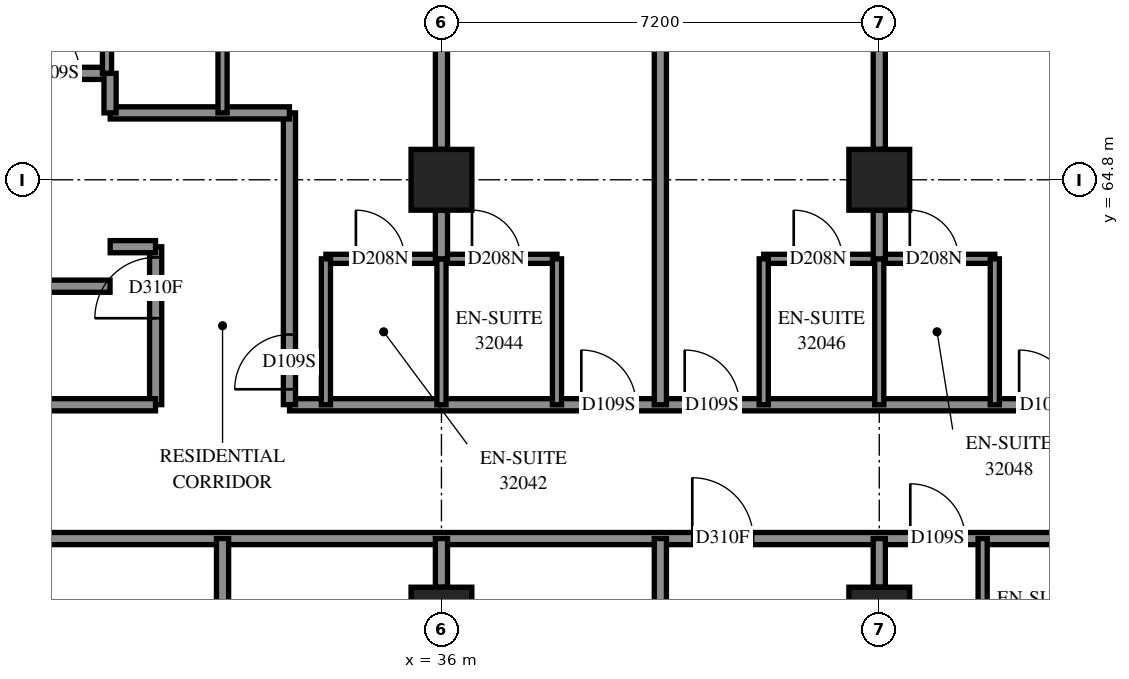
"""IFC4 building model, lengths in metres.
Left out: names, types, materials, properties, quantities, classifications, styles, units other than length and angle.
Written with IfcOpenShell. Run it as: python <this file> out.ifc"""

import sys

from ifc_helpers import new_model, si_unit, direction, frame, frame_2d, origin, origin_2d, place, context, subcontext, project, spatial, rectangle, extrude, element, fill, save


model = new_model("IFC4")
c1 = context("Model", 3, precision=1e-05, world=origin(), true_north=direction((0.0, 1.0)))
c2 = subcontext(c1, "Body", "Model", "MODEL_VIEW")
j1 = project(units=[si_unit("LENGTHUNIT", "METRE"), si_unit("PLANEANGLEUNIT", "RADIAN")], contexts=[c1])
p1 = place(None, origin())
s1 = spatial("IfcSite", under=j1, at=p1, CompositionType="ELEMENT")
p2 = place(p1, origin())
s2 = spatial("IfcBuilding", under=s1, at=p2, CompositionType="ELEMENT")
p3 = place(p2, frame((0.0, 0.0, 118.6)))
s3 = spatial("IfcBuildingStorey", under=s2, at=p3, CompositionType="ELEMENT", Elevation=118.6)
for number, where, z_axis, x_axis in (
    (1, (36.0, 57.6, 0.0), (0.0, 0.0, 1.0), (1.0, 0.0, 0.0)),
    (2, (36.0, 64.8, 0.0), (0.0, 0.0, 1.0), (1.0, 0.0, 0.0)),
    (3, (43.2, 57.6, 0.0), (0.0, 0.0, 1.0), (1.0, 0.0, 0.0)),
    (4, (43.2, 64.8, 0.0), (0.0, 0.0, 1.0), (1.0, 0.0, 0.0)),
):
    element("IfcColumn", number, at=place(p3, frame(where, z_axis=z_axis, x_axis=x_axis)), inside=s3, PredefinedType="COLUMN", context=c2, shape_type="SweptSolid", body=[
        extrude(rectangle(XDim=1.0, YDim=1.0, at=origin_2d()), origin(), (0.0, 0.0, 1.0), 3.1),
    ])
p4 = place(p3, frame((28.802, 58.9, 0.0), z_axis=(0.0, 0.0, 1.0), x_axis=(1.0, 0.0, 0.0)))
e5 = element("IfcWall", 5, at=p4, inside=s3, PredefinedType="PARTITIONING", context=c2, shape_type="SweptSolid", body=[
    extrude(rectangle(XDim=24.098, YDim=0.2, at=frame_2d((12.049, 0.0))), origin(), (0.0, 0.0, 1.0), 3.1),
])
p5 = place(p4, frame((11.323, 0.0, 0.0)))
e6 = element("IfcOpeningElement", 6, at=p5, cuts=e5, PredefinedType="OPENING", context=c2, shape_type="SweptSolid", body=[
    extrude(rectangle(XDim=1.0, YDim=2.1, at=frame_2d((0.5, 1.05))), frame((0.0, 0.11, 0.0), z_axis=(0.0, -1.0, 0.0), x_axis=(1.0, 0.0, 0.0)), (0.0, 0.0, 1.0), 0.22),
])
p6 = place(p4, frame((14.908, 0.0, 0.0)))
e7 = element("IfcOpeningElement", 7, at=p6, cuts=e5, PredefinedType="OPENING", context=c2, shape_type="SweptSolid", body=[
    extrude(rectangle(XDim=0.9, YDim=2.1, at=frame_2d((0.45, 1.05))), frame((0.0, 0.11, 0.0), z_axis=(0.0, -1.0, 0.0), x_axis=(1.0, 0.0, 0.0)), (0.0, 0.0, 1.0), 0.22),
])
p7 = place(p4, frame((18.523, 0.0, 0.0)))
e8 = element("IfcOpeningElement", 8, at=p7, cuts=e5, PredefinedType="OPENING", context=c2, shape_type="SweptSolid", body=[
    extrude(rectangle(XDim=1.0, YDim=2.1, at=frame_2d((0.5, 1.05))), frame((0.0, 0.11, 0.0), z_axis=(0.0, -1.0, 0.0), x_axis=(1.0, 0.0, 0.0)), (0.0, 0.0, 1.0), 0.22),
])
p8 = place(p4, frame((22.845, 0.0, 0.0)))
e9 = element("IfcOpeningElement", 9, at=p8, cuts=e5, PredefinedType="OPENING", context=c2, shape_type="SweptSolid", body=[
    extrude(rectangle(XDim=1.0, YDim=2.1, at=frame_2d((0.5, 1.05))), frame((0.0, 0.11, 0.0), z_axis=(0.0, -1.0, 0.0), x_axis=(1.0, 0.0, 0.0)), (0.0, 0.0, 1.0), 0.22),
])
p9 = place(p3, frame((33.502, 61.1, 0.0), z_axis=(0.0, 0.0, 1.0), x_axis=(1.0, 0.0, 0.0)))
e10 = element("IfcWall", 10, at=p9, inside=s3, PredefinedType="PARTITIONING", context=c2, shape_type="SweptSolid", body=[
    extrude(rectangle(XDim=21.198, YDim=0.2, at=frame_2d((10.599, 0.0))), origin(), (0.0, 0.0, 1.0), 3.1),
])
p10 = place(p9, frame((4.798, 0.0, 0.0)))
e11 = element("IfcOpeningElement", 11, at=p10, cuts=e10, PredefinedType="OPENING", context=c2, shape_type="SweptSolid", body=[
    extrude(rectangle(XDim=0.9, YDim=2.1, at=frame_2d((0.45, 1.05))), frame((0.0, 0.11, 0.0), z_axis=(0.0, -1.0, 0.0), x_axis=(1.0, 0.0, 0.0)), (0.0, 0.0, 1.0), 0.22),
])
p11 = place(p9, frame((6.498, 0.0, 0.0)))
e12 = element("IfcOpeningElement", 12, at=p11, cuts=e10, PredefinedType="OPENING", context=c2, shape_type="SweptSolid", body=[
    extrude(rectangle(XDim=0.9, YDim=2.1, at=frame_2d((0.45, 1.05))), frame((0.0, 0.11, 0.0), z_axis=(0.0, -1.0, 0.0), x_axis=(1.0, 0.0, 0.0)), (0.0, 0.0, 1.0), 0.22),
])
p12 = place(p9, frame((11.998, 0.0, 0.0)))
e13 = element("IfcOpeningElement", 13, at=p12, cuts=e10, PredefinedType="OPENING", context=c2, shape_type="SweptSolid", body=[
    extrude(rectangle(XDim=0.9, YDim=2.1, at=frame_2d((0.45, 1.05))), frame((0.0, 0.11, 0.0), z_axis=(0.0, -1.0, 0.0), x_axis=(1.0, 0.0, 0.0)), (0.0, 0.0, 1.0), 0.22),
])
p13 = place(p9, frame((13.698, 0.0, 0.0)))
e14 = element("IfcOpeningElement", 14, at=p13, cuts=e10, PredefinedType="OPENING", context=c2, shape_type="SweptSolid", body=[
    extrude(rectangle(XDim=0.9, YDim=2.1, at=frame_2d((0.45, 1.05))), frame((0.0, 0.11, 0.0), z_axis=(0.0, -1.0, 0.0), x_axis=(1.0, 0.0, 0.0)), (0.0, 0.0, 1.0), 0.22),
])
p14 = place(p9, frame((19.198, 0.0, 0.0)))
e15 = element("IfcOpeningElement", 15, at=p14, cuts=e10, PredefinedType="OPENING", context=c2, shape_type="SweptSolid", body=[
    extrude(rectangle(XDim=0.9, YDim=2.1, at=frame_2d((0.45, 1.05))), frame((0.0, 0.11, 0.0), z_axis=(0.0, -1.0, 0.0), x_axis=(1.0, 0.0, 0.0)), (0.0, 0.0, 1.0), 0.22),
])
p15 = place(p3, frame((39.6, 61.1, 0.0), z_axis=(0.0, 0.0, 1.0), x_axis=(0.0, 1.0, 0.0)))
e16 = element("IfcWall", 16, at=p15, inside=s3, PredefinedType="PARTITIONING", context=c2, shape_type="SweptSolid", body=[
    extrude(rectangle(XDim=11.768, YDim=0.2, at=frame_2d((5.884, 0.0))), origin(), (0.0, 0.0, 1.0), 3.1),
])
for number, where, z_axis, x_axis in (
    (17, (36.0, 65.3, 0.0), (0.0, 0.0, 1.0), (0.0, 1.0, 0.0)),
    (18, (43.2, 65.3, 0.0), (0.0, 0.0, 1.0), (0.0, 1.0, 0.0)),
):
    element("IfcWall", number, at=place(p3, frame(where, z_axis=z_axis, x_axis=x_axis)), inside=s3, PredefinedType="PARTITIONING", context=c2, shape_type="SweptSolid", body=[
        extrude(rectangle(XDim=6.2, YDim=0.2, at=frame_2d((3.1, 0.0))), origin(), (0.0, 0.0, 1.0), 3.1),
    ])
p16 = place(p3, frame((33.5, 61.102, 0.0), z_axis=(0.0, 0.0, 1.0), x_axis=(0.0, 1.0, 0.0)))
e19 = element("IfcWall", 19, at=p16, inside=s3, PredefinedType="PARTITIONING", context=c2, shape_type="SweptSolid", body=[
    extrude(rectangle(XDim=4.798, YDim=0.2, at=frame_2d((2.399, 0.0))), origin(), (0.0, 0.0, 1.0), 3.1),
])
p17 = place(p16, frame((0.253, 0.0, 0.0)))
e20 = element("IfcOpeningElement", 20, at=p17, cuts=e19, PredefinedType="OPENING", context=c2, shape_type="SweptSolid", body=[
    extrude(rectangle(XDim=0.9, YDim=2.1, at=frame_2d((0.45, 1.05))), frame((0.0, 0.11, 0.0), z_axis=(0.0, -1.0, 0.0), x_axis=(1.0, 0.0, 0.0)), (0.0, 0.0, 1.0), 0.22),
])
p18 = place(p3, frame((41.3, 63.5, 0.0), z_axis=(0.0, 0.0, 1.0), x_axis=(1.0, 0.0, 0.0)))
e21 = element("IfcWall", 21, at=p18, inside=s3, PredefinedType="PARTITIONING", context=c2, shape_type="SweptSolid", body=[
    extrude(rectangle(XDim=3.8, YDim=0.15, at=frame_2d((1.9, 0.0))), origin(), (0.0, 0.0, 1.0), 3.1),
])
p19 = place(p18, frame((0.493, 0.0, 0.0)))
e22 = element("IfcOpeningElement", 22, at=p19, cuts=e21, PredefinedType="OPENING", context=c2, shape_type="SweptSolid", body=[
    extrude(rectangle(XDim=0.8, YDim=2.1, at=frame_2d((0.4, 1.05))), frame((0.0, 0.085, 0.0), z_axis=(0.0, -1.0, 0.0), x_axis=(1.0, 0.0, 0.0)), (0.0, 0.0, 1.0), 0.17),
])
p20 = place(p18, frame((2.402, 0.0, 0.0)))
e23 = element("IfcOpeningElement", 23, at=p20, cuts=e21, PredefinedType="OPENING", context=c2, shape_type="SweptSolid", body=[
    extrude(rectangle(XDim=0.8, YDim=2.1, at=frame_2d((0.4, 1.05))), frame((0.0, 0.085, 0.0), z_axis=(0.0, -1.0, 0.0), x_axis=(1.0, 0.0, 0.0)), (0.0, 0.0, 1.0), 0.17),
])
p21 = place(p3, frame((34.1, 63.5, 0.0), z_axis=(0.0, 0.0, 1.0), x_axis=(1.0, 0.0, 0.0)))
e24 = element("IfcWall", 24, at=p21, inside=s3, PredefinedType="PARTITIONING", context=c2, shape_type="SweptSolid", body=[
    extrude(rectangle(XDim=3.8, YDim=0.15, at=frame_2d((1.9, 0.0))), origin(), (0.0, 0.0, 1.0), 3.1),
])
p22 = place(p21, frame((0.493, 0.0, 0.0)))
e25 = element("IfcOpeningElement", 25, at=p22, cuts=e24, PredefinedType="OPENING", context=c2, shape_type="SweptSolid", body=[
    extrude(rectangle(XDim=0.8, YDim=2.1, at=frame_2d((0.4, 1.05))), frame((0.0, 0.085, 0.0), z_axis=(0.0, -1.0, 0.0), x_axis=(1.0, 0.0, 0.0)), (0.0, 0.0, 1.0), 0.17),
])
p23 = place(p21, frame((2.402, 0.0, 0.0)))
e26 = element("IfcOpeningElement", 26, at=p23, cuts=e24, PredefinedType="OPENING", context=c2, shape_type="SweptSolid", body=[
    extrude(rectangle(XDim=0.8, YDim=2.1, at=frame_2d((0.4, 1.05))), frame((0.0, 0.085, 0.0), z_axis=(0.0, -1.0, 0.0), x_axis=(1.0, 0.0, 0.0)), (0.0, 0.0, 1.0), 0.17),
])
p24 = place(p3, frame((27.1, 66.55, 0.0), z_axis=(0.0, 0.0, 1.0), x_axis=(1.0, 0.0, 0.0)))
e27 = element("IfcWall", 27, at=p24, inside=s3, PredefinedType="PARTITIONING", context=c2, shape_type="SweptSolid", body=[
    extrude(rectangle(XDim=3.4, YDim=0.2, at=frame_2d((1.7, 0.0))), origin(), (0.0, 0.0, 1.0), 3.1),
])
p25 = place(p24, frame((0.4, 0.0, 0.0)))
e28 = element("IfcOpeningElement", 28, at=p25, cuts=e27, PredefinedType="OPENING", context=c2, shape_type="SweptSolid", body=[
    extrude(rectangle(XDim=0.9, YDim=2.1, at=frame_2d((0.45, 1.05))), frame((0.0, 0.11, 0.0), z_axis=(0.0, -1.0, 0.0), x_axis=(1.0, 0.0, 0.0)), (0.0, 0.0, 1.0), 0.22),
])
p26 = place(p24, frame((2.05, 0.0, 0.0)))
e29 = element("IfcOpeningElement", 29, at=p26, cuts=e27, PredefinedType="OPENING", context=c2, shape_type="SweptSolid", body=[
    extrude(rectangle(XDim=0.9, YDim=2.1, at=frame_2d((0.45, 1.05))), frame((0.0, 0.11, 0.0), z_axis=(0.0, -1.0, 0.0), x_axis=(1.0, 0.0, 0.0)), (0.0, 0.0, 1.0), 0.22),
])
for number, where, z_axis, x_axis in (
    (30, (32.4, 55.717, 0.0), (0.0, 0.0, 1.0), (0.0, 1.0, 0.0)),
    (31, (39.6, 55.717, 0.0), (0.0, 0.0, 1.0), (0.0, 1.0, 0.0)),
):
    element("IfcWall", number, at=place(p3, frame(where, z_axis=z_axis, x_axis=x_axis)), inside=s3, PredefinedType="PARTITIONING", context=c2, shape_type="SweptSolid", body=[
        extrude(rectangle(XDim=3.183, YDim=0.2, at=frame_2d((1.591, 0.0))), origin(), (0.0, 0.0, 1.0), 3.1),
    ])
p27 = place(p3, frame((30.552, 65.9, 0.0), z_axis=(0.0, 0.0, 1.0), x_axis=(1.0, 0.0, 0.0)))
e32 = element("IfcWall", 32, at=p27, inside=s3, PredefinedType="PARTITIONING", context=c2, shape_type="SweptSolid", body=[
    extrude(rectangle(XDim=2.948, YDim=0.2, at=frame_2d((1.474, 0.0))), origin(), (0.0, 0.0, 1.0), 3.1),
])
p28 = place(p3, frame((31.3, 61.102, 0.0), z_axis=(0.0, 0.0, 1.0), x_axis=(0.0, 1.0, 0.0)))
e33 = element("IfcWall", 33, at=p28, inside=s3, PredefinedType="PARTITIONING", context=c2, shape_type="SweptSolid", body=[
    extrude(rectangle(XDim=2.596, YDim=0.2, at=frame_2d((1.298, 0.0))), origin(), (0.0, 0.0, 1.0), 3.1),
])
p29 = place(p28, frame((1.421, 0.0, 0.0)))
e34 = element("IfcOpeningElement", 34, at=p29, cuts=e33, PredefinedType="OPENING", context=c2, shape_type="SweptSolid", body=[
    extrude(rectangle(XDim=1.0, YDim=2.1, at=frame_2d((0.5, 1.05))), frame((0.0, 0.11, 0.0), z_axis=(0.0, -1.0, 0.0), x_axis=(1.0, 0.0, 0.0)), (0.0, 0.0, 1.0), 0.22),
])
p30 = place(p3, frame((28.802, 61.1, 0.0), z_axis=(0.0, 0.0, 1.0), x_axis=(1.0, 0.0, 0.0)))
e35 = element("IfcWall", 35, at=p30, inside=s3, PredefinedType="PARTITIONING", context=c2, shape_type="SweptSolid", body=[
    extrude(rectangle(XDim=2.496, YDim=0.2, at=frame_2d((1.248, 0.0))), origin(), (0.0, 0.0, 1.0), 3.1),
])
for number, where, z_axis, x_axis in (
    (36, (34.1, 61.1, 0.0), (0.0, 0.0, 1.0), (0.0, 1.0, 0.0)),
    (37, (36.0, 61.1, 0.0), (0.0, 0.0, 1.0), (0.0, 1.0, 0.0)),
    (38, (37.9, 61.1, 0.0), (0.0, 0.0, 1.0), (0.0, 1.0, 0.0)),
    (39, (41.3, 61.1, 0.0), (0.0, 0.0, 1.0), (0.0, 1.0, 0.0)),
    (40, (43.2, 61.1, 0.0), (0.0, 0.0, 1.0), (0.0, 1.0, 0.0)),
    (41, (45.1, 61.1, 0.0), (0.0, 0.0, 1.0), (0.0, 1.0, 0.0)),
    (42, (44.9, 56.5, 0.0), (0.0, 0.0, 1.0), (0.0, 1.0, 0.0)),
    (43, (32.4, 65.9, 0.0), (0.0, 0.0, 1.0), (0.0, 1.0, 0.0)),
):
    element("IfcWall", number, at=place(p3, frame(where, z_axis=z_axis, x_axis=x_axis)), inside=s3, PredefinedType="PARTITIONING", context=c2, shape_type="SweptSolid", body=[
        extrude(rectangle(XDim=2.4, YDim=0.15, at=frame_2d((1.2, 0.0))), origin(), (0.0, 0.0, 1.0), 3.1),
    ])
p31 = place(p3, frame((28.15, 63.05, 0.0), z_axis=(0.0, 0.0, 1.0), x_axis=(1.0, 0.0, 0.0)))
e44 = element("IfcWall", 44, at=p31, inside=s3, PredefinedType="PARTITIONING", context=c2, shape_type="SweptSolid", body=[
    extrude(rectangle(XDim=2.4, YDim=0.2, at=frame_2d((1.2, 0.0))), origin(), (0.0, 0.0, 1.0), 3.1),
])
p32 = place(p3, frame((30.5, 66.55, 0.0), z_axis=(0.0, 0.0, 1.0), x_axis=(0.0, 1.0, 0.0)))
e45 = element("IfcWall", 45, at=p32, inside=s3, PredefinedType="PARTITIONING", context=c2, shape_type="SweptSolid", body=[
    extrude(rectangle(XDim=1.75, YDim=0.15, at=frame_2d((0.875, 0.0))), origin(), (0.0, 0.0, 1.0), 3.1),
])
for number, where, z_axis, x_axis in (
    (46, (36.0, 58.1, 0.0), (0.0, 0.0, 1.0), (0.0, 1.0, 0.0)),
    (47, (36.0, 63.5, 0.0), (0.0, 0.0, 1.0), (0.0, 1.0, 0.0)),
    (48, (43.2, 58.1, 0.0), (0.0, 0.0, 1.0), (0.0, 1.0, 0.0)),
    (49, (43.2, 63.5, 0.0), (0.0, 0.0, 1.0), (0.0, 1.0, 0.0)),
):
    element("IfcWall", number, at=place(p3, frame(where, z_axis=z_axis, x_axis=x_axis)), inside=s3, PredefinedType="PARTITIONING", context=c2, shape_type="SweptSolid", body=[
        extrude(rectangle(XDim=0.8, YDim=0.2, at=frame_2d((0.4, 0.0))), origin(), (0.0, 0.0, 1.0), 3.1),
    ])
p33 = place(p3, frame((30.552, 63.7, 0.0), z_axis=(0.0, 0.0, 1.0), x_axis=(1.0, 0.0, 0.0)))
e50 = element("IfcWall", 50, at=p33, inside=s3, PredefinedType="PARTITIONING", context=c2, shape_type="SweptSolid", body=[
    extrude(rectangle(XDim=0.746, YDim=0.2, at=frame_2d((0.373, 0.0))), origin(), (0.0, 0.0, 1.0), 3.1),
])
p34 = place(p3, frame((30.55, 65.9, 0.0), z_axis=(0.0, 0.0, 1.0), x_axis=(0.0, 1.0, 0.0)))
e51 = element("IfcWall", 51, at=p34, inside=s3, PredefinedType="PARTITIONING", context=c2, shape_type="SweptSolid", body=[
    extrude(rectangle(XDim=0.65, YDim=0.2, at=frame_2d((0.325, 0.0))), origin(), (0.0, 0.0, 1.0), 3.1),
])
p35 = place(p29, origin())
e52 = element("IfcDoor", 52, at=p35, inside=s3, OperationType="SINGLE_SWING_LEFT", PredefinedType="DOOR", context=c2, shape_type="SweptSolid", body=[
    extrude(rectangle(XDim=1.0, YDim=2.1, at=frame_2d((0.5, 1.05))), frame((0.0, 0.025, 0.0), z_axis=(0.0, -1.0, 0.0), x_axis=(1.0, 0.0, 0.0)), (0.0, 0.0, 1.0), 0.05),
])
fill(e34, e52)
p36 = place(p5, origin())
e53 = element("IfcDoor", 53, at=p36, inside=s3, OperationType="SINGLE_SWING_RIGHT", PredefinedType="DOOR", context=c2, shape_type="SweptSolid", body=[
    extrude(rectangle(XDim=1.0, YDim=2.1, at=frame_2d((0.5, 1.05))), frame((0.0, 0.025, 0.0), z_axis=(0.0, -1.0, 0.0), x_axis=(1.0, 0.0, 0.0)), (0.0, 0.0, 1.0), 0.05),
])
fill(e6, e53)
p37 = place(p6, origin())
e54 = element("IfcDoor", 54, at=p37, inside=s3, OperationType="SINGLE_SWING_LEFT", PredefinedType="DOOR", context=c2, shape_type="SweptSolid", body=[
    extrude(rectangle(XDim=0.9, YDim=2.1, at=frame_2d((0.45, 1.05))), frame((0.0, 0.025, 0.0), z_axis=(0.0, -1.0, 0.0), x_axis=(1.0, 0.0, 0.0)), (0.0, 0.0, 1.0), 0.05),
])
fill(e7, e54)
p38 = place(p26, origin())
e55 = element("IfcDoor", 55, at=p38, inside=s3, OperationType="SINGLE_SWING_RIGHT", PredefinedType="DOOR", context=c2, shape_type="SweptSolid", body=[
    extrude(rectangle(XDim=0.9, YDim=2.1, at=frame_2d((0.45, 1.05))), frame((0.0, 0.025, 0.0), z_axis=(0.0, -1.0, 0.0), x_axis=(1.0, 0.0, 0.0)), (0.0, 0.0, 1.0), 0.05),
])
fill(e29, e55)
p39 = place(p17, origin())
e56 = element("IfcDoor", 56, at=p39, inside=s3, OperationType="SINGLE_SWING_LEFT", PredefinedType="DOOR", context=c2, shape_type="SweptSolid", body=[
    extrude(rectangle(XDim=0.9, YDim=2.1, at=frame_2d((0.45, 1.05))), frame((0.0, 0.025, 0.0), z_axis=(0.0, -1.0, 0.0), x_axis=(1.0, 0.0, 0.0)), (0.0, 0.0, 1.0), 0.05),
])
fill(e20, e56)
p40 = place(p22, origin())
e57 = element("IfcDoor", 57, at=p40, inside=s3, OperationType="SINGLE_SWING_RIGHT", PredefinedType="DOOR", context=c2, shape_type="SweptSolid", body=[
    extrude(rectangle(XDim=0.8, YDim=2.1, at=frame_2d((0.4, 1.05))), frame((0.0, 0.025, 0.0), z_axis=(0.0, -1.0, 0.0), x_axis=(1.0, 0.0, 0.0)), (0.0, 0.0, 1.0), 0.05),
])
fill(e25, e57)
p41 = place(p10, origin())
e58 = element("IfcDoor", 58, at=p41, inside=s3, OperationType="SINGLE_SWING_RIGHT", PredefinedType="DOOR", context=c2, shape_type="SweptSolid", body=[
    extrude(rectangle(XDim=0.9, YDim=2.1, at=frame_2d((0.45, 1.05))), frame((0.0, 0.025, 0.0), z_axis=(0.0, -1.0, 0.0), x_axis=(1.0, 0.0, 0.0)), (0.0, 0.0, 1.0), 0.05),
])
fill(e11, e58)
p42 = place(p23, origin())
e59 = element("IfcDoor", 59, at=p42, inside=s3, OperationType="SINGLE_SWING_RIGHT", PredefinedType="DOOR", context=c2, shape_type="SweptSolid", body=[
    extrude(rectangle(XDim=0.8, YDim=2.1, at=frame_2d((0.4, 1.05))), frame((0.0, 0.025, 0.0), z_axis=(0.0, -1.0, 0.0), x_axis=(1.0, 0.0, 0.0)), (0.0, 0.0, 1.0), 0.05),
])
fill(e26, e59)
p43 = place(p11, origin())
e60 = element("IfcDoor", 60, at=p43, inside=s3, OperationType="SINGLE_SWING_LEFT", PredefinedType="DOOR", context=c2, shape_type="SweptSolid", body=[
    extrude(rectangle(XDim=0.9, YDim=2.1, at=frame_2d((0.45, 1.05))), frame((0.0, 0.025, 0.0), z_axis=(0.0, -1.0, 0.0), x_axis=(1.0, 0.0, 0.0)), (0.0, 0.0, 1.0), 0.05),
])
fill(e12, e60)
p44 = place(p19, origin())
e61 = element("IfcDoor", 61, at=p44, inside=s3, OperationType="SINGLE_SWING_RIGHT", PredefinedType="DOOR", context=c2, shape_type="SweptSolid", body=[
    extrude(rectangle(XDim=0.8, YDim=2.1, at=frame_2d((0.4, 1.05))), frame((0.0, 0.025, 0.0), z_axis=(0.0, -1.0, 0.0), x_axis=(1.0, 0.0, 0.0)), (0.0, 0.0, 1.0), 0.05),
])
fill(e22, e61)
p45 = place(p12, origin())
e62 = element("IfcDoor", 62, at=p45, inside=s3, OperationType="SINGLE_SWING_RIGHT", PredefinedType="DOOR", context=c2, shape_type="SweptSolid", body=[
    extrude(rectangle(XDim=0.9, YDim=2.1, at=frame_2d((0.45, 1.05))), frame((0.0, 0.025, 0.0), z_axis=(0.0, -1.0, 0.0), x_axis=(1.0, 0.0, 0.0)), (0.0, 0.0, 1.0), 0.05),
])
fill(e13, e62)
p46 = place(p20, origin())
e63 = element("IfcDoor", 63, at=p46, inside=s3, OperationType="SINGLE_SWING_RIGHT", PredefinedType="DOOR", context=c2, shape_type="SweptSolid", body=[
    extrude(rectangle(XDim=0.8, YDim=2.1, at=frame_2d((0.4, 1.05))), frame((0.0, 0.025, 0.0), z_axis=(0.0, -1.0, 0.0), x_axis=(1.0, 0.0, 0.0)), (0.0, 0.0, 1.0), 0.05),
])
fill(e23, e63)
save(model, sys.argv[1])
